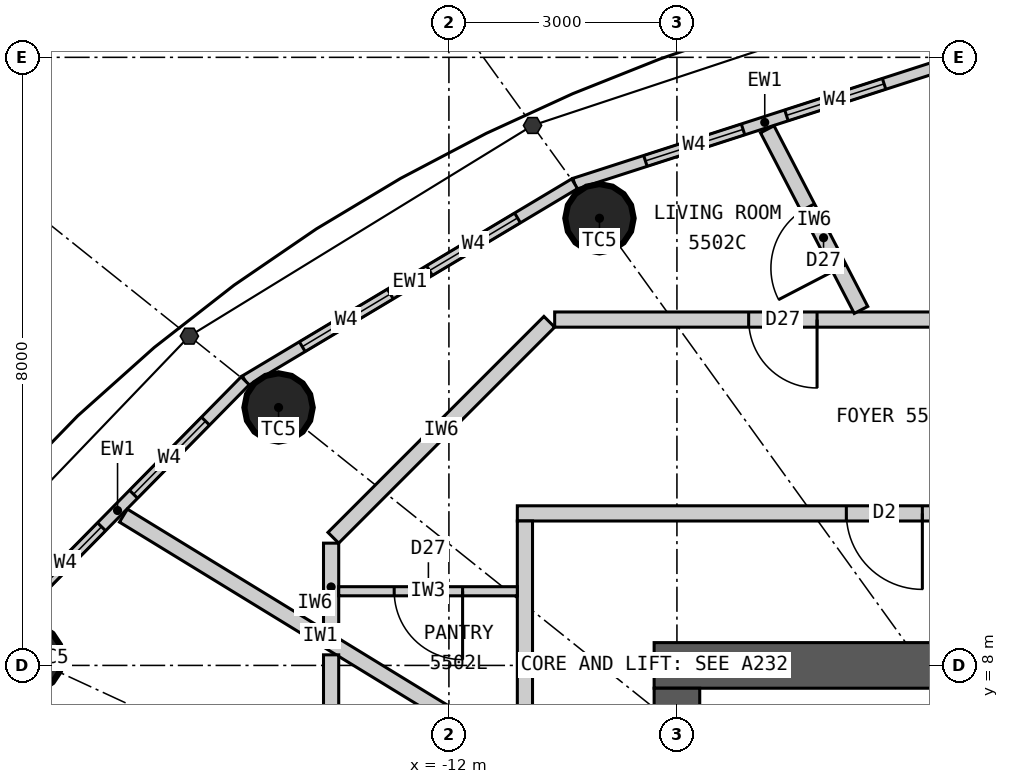
"""IFC4 building model, lengths in metres.
Left out: names, types, materials, properties, quantities, classifications, styles, units other than length and angle.
Written with IfcOpenShell. Run it as: python <this file> out.ifc"""

import sys

from ifc_helpers import new_model, si_unit, direction, frame, frame_2d, origin, origin_2d, place, context, subcontext, project, spatial, rectangle, circle, extrude, element, fill, save


model = new_model("IFC4")
c1 = context("Model", 3, precision=1e-05, world=origin(), true_north=direction((0.0, 1.0)))
c2 = subcontext(c1, "Body", "Model", "MODEL_VIEW")
j1 = project(units=[si_unit("LENGTHUNIT", "METRE"), si_unit("PLANEANGLEUNIT", "RADIAN")], contexts=[c1])
p1 = place(None, origin())
s1 = spatial("IfcSite", under=j1, at=p1, CompositionType="ELEMENT")
p2 = place(p1, origin())
s2 = spatial("IfcBuilding", under=s1, at=p2, CompositionType="ELEMENT")
p3 = place(p2, frame((0.0, 0.0, 206.1)))
s3 = spatial("IfcBuildingStorey", under=s2, at=p3, CompositionType="ELEMENT", Elevation=206.1)
for number, where, z_axis, x_axis in (
    (1, (-10.019, 13.883, 0.0), (0.0, 0.0, 1.0), (1.0, 0.0, 0.0)),
    (2, (-14.241, 11.393, 0.0), (0.0, 0.0, 1.0), (1.0, 0.0, 0.0)),
    (3, (-17.532, 8.098, 0.0), (0.0, 0.0, 1.0), (1.0, 0.0, 0.0)),
):
    element("IfcColumn", number, at=place(p3, frame(where, z_axis=z_axis, x_axis=x_axis)), inside=s3, PredefinedType="COLUMN", context=c2, shape_type="SweptSolid", body=[
        extrude(circle(Radius=0.45, at=origin_2d()), origin(), (0.0, 0.0, 1.0), 3.3),
    ])
p4 = place(p3, frame((-9.3, 8.0, 0.0), z_axis=(0.0, 0.0, 1.0), x_axis=(1.0, 0.0, 0.0)))
e4 = element("IfcWall", 4, at=p4, inside=s3, PredefinedType="SHEAR", context=c2, shape_type="SweptSolid", body=[
    extrude(rectangle(XDim=18.6, YDim=0.6, at=frame_2d((9.3, 0.0))), origin(), (0.0, 0.0, 1.0), 3.3),
])
p5 = place(p4, frame((8.0, 0.0, 0.0)))
e5 = element("IfcOpeningElement", 5, at=p5, cuts=e4, PredefinedType="OPENING", context=c2, shape_type="SweptSolid", body=[
    extrude(rectangle(XDim=1.2, YDim=2.2, at=frame_2d((0.6, 1.1))), frame((0.0, 0.31, 0.0), z_axis=(0.0, -1.0, 0.0), x_axis=(1.0, 0.0, 0.0)), (0.0, 0.0, 1.0), 0.62),
])
p6 = place(p4, frame((15.6, 0.0, 0.0)))
e6 = element("IfcOpeningElement", 6, at=p6, cuts=e4, PredefinedType="OPENING", context=c2, shape_type="SweptSolid", body=[
    extrude(rectangle(XDim=0.9, YDim=2.2, at=frame_2d((0.45, 1.1))), frame((0.0, 0.31, 0.0), z_axis=(0.0, -1.0, 0.0), x_axis=(1.0, 0.0, 0.0)), (0.0, 0.0, 1.0), 0.62),
])
p7 = place(p3, frame((-9.0, 7.7, 0.0), z_axis=(0.0, 0.0, 1.0), x_axis=(0.0, -1.0, 0.0)))
e7 = element("IfcWall", 7, at=p7, inside=s3, PredefinedType="SHEAR", context=c2, shape_type="SweptSolid", body=[
    extrude(rectangle(XDim=15.4, YDim=0.6, at=frame_2d((7.7, 0.0))), origin(), (0.0, 0.0, 1.0), 3.3),
])
p8 = place(p7, frame((6.8, 0.0, 0.0)))
e8 = element("IfcOpeningElement", 8, at=p8, cuts=e7, PredefinedType="OPENING", context=c2, shape_type="SweptSolid", body=[
    extrude(rectangle(XDim=1.8, YDim=2.2, at=frame_2d((0.9, 1.1))), frame((0.0, 0.31, 0.0), z_axis=(0.0, -1.0, 0.0), x_axis=(1.0, 0.0, 0.0)), (0.0, 0.0, 1.0), 0.62),
])
p9 = place(p3, frame((-5.343, 15.952, 0.0), z_axis=(0.0, 0.0, 1.0), x_axis=(-0.951644702515, -0.307200846638, 0.0)))
e9 = element("IfcWall", 9, at=p9, inside=s3, PredefinedType="ELEMENTEDWALL", context=c2, shape_type="SweptSolid", body=[
    extrude(rectangle(XDim=5.258, YDim=0.15, at=frame_2d((2.629, 0.0))), origin(), (0.0, 0.0, 1.0), 3.12),
])
p10 = place(p9, frame((0.979, 0.0, 0.9)))
e10 = element("IfcOpeningElement", 10, at=p10, cuts=e9, PredefinedType="OPENING", context=c2, shape_type="SweptSolid", body=[
    extrude(rectangle(XDim=1.35, YDim=1.9, at=frame_2d((0.675, 0.95))), frame((0.0, 0.085, 0.0), z_axis=(0.0, -1.0, 0.0), x_axis=(1.0, 0.0, 0.0)), (0.0, 0.0, 1.0), 0.17),
])
p11 = place(p9, frame((2.929, 0.0, 0.9)))
e11 = element("IfcOpeningElement", 11, at=p11, cuts=e9, PredefinedType="OPENING", context=c2, shape_type="SweptSolid", body=[
    extrude(rectangle(XDim=1.35, YDim=1.9, at=frame_2d((0.675, 0.95))), frame((0.0, 0.085, 0.0), z_axis=(0.0, -1.0, 0.0), x_axis=(1.0, 0.0, 0.0)), (0.0, 0.0, 1.0), 0.17),
])
p12 = place(p3, frame((-10.346, 14.336, 0.0), z_axis=(0.0, 0.0, 1.0), x_axis=(-0.85822150553, -0.513279502265, 0.0)))
e12 = element("IfcWall", 12, at=p12, inside=s3, PredefinedType="ELEMENTEDWALL", context=c2, shape_type="SweptSolid", body=[
    extrude(rectangle(XDim=5.05, YDim=0.15, at=frame_2d((2.525, 0.0))), origin(), (0.0, 0.0, 1.0), 3.12),
])
p13 = place(p12, frame((0.875, 0.0, 0.9)))
e13 = element("IfcOpeningElement", 13, at=p13, cuts=e12, PredefinedType="OPENING", context=c2, shape_type="SweptSolid", body=[
    extrude(rectangle(XDim=1.35, YDim=1.9, at=frame_2d((0.675, 0.95))), frame((0.0, 0.085, 0.0), z_axis=(0.0, -1.0, 0.0), x_axis=(1.0, 0.0, 0.0)), (0.0, 0.0, 1.0), 0.17),
])
p14 = place(p12, frame((2.825, 0.0, 0.9)))
e14 = element("IfcOpeningElement", 14, at=p14, cuts=e12, PredefinedType="OPENING", context=c2, shape_type="SweptSolid", body=[
    extrude(rectangle(XDim=1.35, YDim=1.9, at=frame_2d((0.675, 0.95))), frame((0.0, 0.085, 0.0), z_axis=(0.0, -1.0, 0.0), x_axis=(1.0, 0.0, 0.0)), (0.0, 0.0, 1.0), 0.17),
])
p15 = place(p3, frame((-14.68, 11.744, 0.0), z_axis=(0.0, 0.0, 1.0), x_axis=(-0.701527379618, -0.712642501993, 0.0)))
e15 = element("IfcWall", 15, at=p15, inside=s3, PredefinedType="ELEMENTEDWALL", context=c2, shape_type="SweptSolid", body=[
    extrude(rectangle(XDim=4.788, YDim=0.15, at=frame_2d((2.394, 0.0))), origin(), (0.0, 0.0, 1.0), 3.12),
])
p16 = place(p15, frame((0.744, 0.0, 0.9)))
e16 = element("IfcOpeningElement", 16, at=p16, cuts=e15, PredefinedType="OPENING", context=c2, shape_type="SweptSolid", body=[
    extrude(rectangle(XDim=1.35, YDim=1.9, at=frame_2d((0.675, 0.95))), frame((0.0, 0.085, 0.0), z_axis=(0.0, -1.0, 0.0), x_axis=(1.0, 0.0, 0.0)), (0.0, 0.0, 1.0), 0.17),
])
p17 = place(p15, frame((2.694, 0.0, 0.9)))
e17 = element("IfcOpeningElement", 17, at=p17, cuts=e15, PredefinedType="OPENING", context=c2, shape_type="SweptSolid", body=[
    extrude(rectangle(XDim=1.35, YDim=1.9, at=frame_2d((0.675, 0.95))), frame((0.0, 0.085, 0.0), z_axis=(0.0, -1.0, 0.0), x_axis=(1.0, 0.0, 0.0)), (0.0, 0.0, 1.0), 0.17),
])
p18 = place(p3, frame((-11.1, 10.0, 0.0), z_axis=(0.0, 0.0, 1.0), x_axis=(1.0, 0.0, 0.0)))
e18 = element("IfcWall", 18, at=p18, inside=s3, PredefinedType="PARTITIONING", context=c2, shape_type="SweptSolid", body=[
    extrude(rectangle(XDim=22.2, YDim=0.2, at=frame_2d((11.1, 0.0))), origin(), (0.0, 0.0, 1.0), 3.12),
])
p19 = place(p18, frame((20.9, 0.0, 0.0)))
e19 = element("IfcOpeningElement", 19, at=p19, cuts=e18, PredefinedType="OPENING", context=c2, shape_type="SweptSolid", body=[
    extrude(rectangle(XDim=1.0, YDim=2.2, at=frame_2d((0.5, 1.1))), frame((0.0, 0.11, 0.0), z_axis=(0.0, -1.0, 0.0), x_axis=(1.0, 0.0, 0.0)), (0.0, 0.0, 1.0), 0.22),
])
p20 = place(p18, frame((4.329, 0.0, 0.0)))
e20 = element("IfcOpeningElement", 20, at=p20, cuts=e18, PredefinedType="OPENING", context=c2, shape_type="SweptSolid", body=[
    extrude(rectangle(XDim=1.0, YDim=2.2, at=frame_2d((0.5, 1.1))), frame((0.0, 0.11, 0.0), z_axis=(0.0, -1.0, 0.0), x_axis=(1.0, 0.0, 0.0)), (0.0, 0.0, 1.0), 0.22),
])
p21 = place(p3, frame((-11.0, 9.9, 0.0), z_axis=(0.0, 0.0, 1.0), x_axis=(0.0, -1.0, 0.0)))
e21 = element("IfcWall", 21, at=p21, inside=s3, PredefinedType="PARTITIONING", context=c2, shape_type="SweptSolid", body=[
    extrude(rectangle(XDim=19.8, YDim=0.2, at=frame_2d((9.9, 0.0))), origin(), (0.0, 0.0, 1.0), 3.12),
])
p22 = place(p21, frame((5.075, 0.0, 0.0)))
e22 = element("IfcOpeningElement", 22, at=p22, cuts=e21, PredefinedType="OPENING", context=c2, shape_type="SweptSolid", body=[
    extrude(rectangle(XDim=1.0, YDim=2.2, at=frame_2d((0.5, 1.1))), frame((0.0, 0.11, 0.0), z_axis=(0.0, -1.0, 0.0), x_axis=(1.0, 0.0, 0.0)), (0.0, 0.0, 1.0), 0.22),
])
p23 = place(p21, frame((18.645, 0.0, 0.0)))
e23 = element("IfcOpeningElement", 23, at=p23, cuts=e21, PredefinedType="OPENING", context=c2, shape_type="SweptSolid", body=[
    extrude(rectangle(XDim=1.0, YDim=2.2, at=frame_2d((0.5, 1.1))), frame((0.0, 0.11, 0.0), z_axis=(0.0, -1.0, 0.0), x_axis=(1.0, 0.0, 0.0)), (0.0, 0.0, 1.0), 0.22),
])
p24 = place(p3, frame((-11.1, 6.797, 0.0), z_axis=(0.0, 0.0, 1.0), x_axis=(-0.852799818179, 0.522237943963, 0.0)))
e24 = element("IfcWall", 24, at=p24, inside=s3, PredefinedType="PARTITIONING", context=c2, shape_type="SweptSolid", body=[
    extrude(rectangle(XDim=6.077, YDim=0.2, at=frame_2d((3.039, 0.0))), origin(), (0.0, 0.0, 1.0), 3.12),
])
p25 = place(p3, frame((6.364, 12.55, 0.0), z_axis=(0.0, 0.0, 1.0), x_axis=(-1.0, 0.0, 0.0)))
e25 = element("IfcWall", 25, at=p25, inside=s3, PredefinedType="PARTITIONING", context=c2, shape_type="SweptSolid", body=[
    extrude(rectangle(XDim=16.972, YDim=0.2, at=frame_2d((8.486, 0.0))), origin(), (0.0, 0.0, 1.0), 3.12),
])
p26 = place(p25, frame((2.525, 0.0, 0.0)))
e26 = element("IfcOpeningElement", 26, at=p26, cuts=e25, PredefinedType="OPENING", context=c2, shape_type="SweptSolid", body=[
    extrude(rectangle(XDim=0.8, YDim=2.1, at=frame_2d((0.4, 1.05))), frame((0.0, 0.11, 0.0), z_axis=(0.0, -1.0, 0.0), x_axis=(1.0, 0.0, 0.0)), (0.0, 0.0, 1.0), 0.22),
])
p27 = place(p25, frame((4.145, 0.0, 0.0)))
e27 = element("IfcOpeningElement", 27, at=p27, cuts=e25, PredefinedType="OPENING", context=c2, shape_type="SweptSolid", body=[
    extrude(rectangle(XDim=0.9, YDim=2.1, at=frame_2d((0.45, 1.05))), frame((0.0, 0.11, 0.0), z_axis=(0.0, -1.0, 0.0), x_axis=(1.0, 0.0, 0.0)), (0.0, 0.0, 1.0), 0.22),
])
p28 = place(p25, frame((13.52, 0.0, 0.0)))
e28 = element("IfcOpeningElement", 28, at=p28, cuts=e25, PredefinedType="OPENING", context=c2, shape_type="SweptSolid", body=[
    extrude(rectangle(XDim=0.9, YDim=2.1, at=frame_2d((0.45, 1.05))), frame((0.0, 0.11, 0.0), z_axis=(0.0, -1.0, 0.0), x_axis=(1.0, 0.0, 0.0)), (0.0, 0.0, 1.0), 0.22),
])
p29 = place(p3, frame((-10.679, 12.521, 0.0), z_axis=(0.0, 0.0, 1.0), x_axis=(-0.707106781187, -0.707106781187, 0.0)))
e29 = element("IfcWall", 29, at=p29, inside=s3, PredefinedType="PARTITIONING", context=c2, shape_type="SweptSolid", body=[
    extrude(rectangle(XDim=4.019, YDim=0.2, at=frame_2d((2.009, 0.0))), origin(), (0.0, 0.0, 1.0), 3.12),
])
p30 = place(p3, frame((-13.55, 9.609, 0.0), z_axis=(0.0, 0.0, 1.0), x_axis=(0.0, -1.0, 0.0)))
e30 = element("IfcWall", 30, at=p30, inside=s3, PredefinedType="PARTITIONING", context=c2, shape_type="SweptSolid", body=[
    extrude(rectangle(XDim=1.153, YDim=0.2, at=frame_2d((0.576, 0.0))), origin(), (0.0, 0.0, 1.0), 3.12),
])
p31 = place(p3, frame((-6.578, 12.677, 0.0), z_axis=(0.0, 0.0, 1.0), x_axis=(-0.460620531465, 0.887597164255, 0.0)))
e31 = element("IfcWall", 31, at=p31, inside=s3, PredefinedType="PARTITIONING", context=c2, shape_type="SweptSolid", body=[
    extrude(rectangle(XDim=2.678, YDim=0.2, at=frame_2d((1.339, 0.0))), origin(), (0.0, 0.0, 1.0), 3.12),
])
p32 = place(p31, frame((0.62, 0.0, 0.0)))
e32 = element("IfcOpeningElement", 32, at=p32, cuts=e31, PredefinedType="OPENING", context=c2, shape_type="SweptSolid", body=[
    extrude(rectangle(XDim=0.9, YDim=2.1, at=frame_2d((0.45, 1.05))), frame((0.0, 0.11, 0.0), z_axis=(0.0, -1.0, 0.0), x_axis=(1.0, 0.0, 0.0)), (0.0, 0.0, 1.0), 0.22),
])
p33 = place(p3, frame((-11.1, 8.976, 0.0), z_axis=(0.0, 0.0, 1.0), x_axis=(-1.0, 0.0, 0.0)))
e33 = element("IfcWall", 33, at=p33, inside=s3, PredefinedType="PARTITIONING", context=c2, shape_type="SweptSolid", body=[
    extrude(rectangle(XDim=2.35, YDim=0.12, at=frame_2d((1.175, 0.0))), origin(), (0.0, 0.0, 1.0), 3.12),
])
p34 = place(p33, frame((0.72, 0.0, 0.0)))
e34 = element("IfcOpeningElement", 34, at=p34, cuts=e33, PredefinedType="OPENING", context=c2, shape_type="SweptSolid", body=[
    extrude(rectangle(XDim=0.9, YDim=2.1, at=frame_2d((0.45, 1.05))), frame((0.0, 0.07, 0.0), z_axis=(0.0, -1.0, 0.0), x_axis=(1.0, 0.0, 0.0)), (0.0, 0.0, 1.0), 0.14),
])
p35 = place(p3, frame((-13.55, 8.139, 0.0), z_axis=(0.0, 0.0, 1.0), x_axis=(0.0, -1.0, 0.0)))
e35 = element("IfcWall", 35, at=p35, inside=s3, PredefinedType="PARTITIONING", context=c2, shape_type="SweptSolid", body=[
    extrude(rectangle(XDim=12.496, YDim=0.2, at=frame_2d((6.248, 0.0))), origin(), (0.0, 0.0, 1.0), 3.12),
])
p36 = place(p35, frame((7.031, 0.0, 0.0)))
e36 = element("IfcOpeningElement", 36, at=p36, cuts=e35, PredefinedType="OPENING", context=c2, shape_type="SweptSolid", body=[
    extrude(rectangle(XDim=0.9, YDim=2.1, at=frame_2d((0.45, 1.05))), frame((0.0, 0.11, 0.0), z_axis=(0.0, -1.0, 0.0), x_axis=(1.0, 0.0, 0.0)), (0.0, 0.0, 1.0), 0.22),
])
p37 = place(p35, frame((9.373, 0.0, 0.0)))
e37 = element("IfcOpeningElement", 37, at=p37, cuts=e35, PredefinedType="OPENING", context=c2, shape_type="SweptSolid", body=[
    extrude(rectangle(XDim=0.8, YDim=2.1, at=frame_2d((0.4, 1.05))), frame((0.0, 0.11, 0.0), z_axis=(0.0, -1.0, 0.0), x_axis=(1.0, 0.0, 0.0)), (0.0, 0.0, 1.0), 0.22),
])
p38 = place(p35, frame((3.789, 0.0, 0.0)))
e38 = element("IfcOpeningElement", 38, at=p38, cuts=e35, PredefinedType="OPENING", context=c2, shape_type="SweptSolid", body=[
    extrude(rectangle(XDim=0.9, YDim=2.1, at=frame_2d((0.45, 1.05))), frame((0.0, 0.11, 0.0), z_axis=(0.0, -1.0, 0.0), x_axis=(1.0, 0.0, 0.0)), (0.0, 0.0, 1.0), 0.22),
])
p39 = place(p10, origin())
e39 = element("IfcWindow", 39, at=p39, inside=s3, PartitioningType="SINGLE_PANEL", PredefinedType="WINDOW", context=c2, shape_type="SweptSolid", body=[
    extrude(rectangle(XDim=1.35, YDim=1.9, at=frame_2d((0.675, 0.95))), frame((0.0, 0.03, 0.0), z_axis=(0.0, -1.0, 0.0), x_axis=(1.0, 0.0, 0.0)), (0.0, 0.0, 1.0), 0.06),
])
fill(e10, e39)
p40 = place(p11, origin())
e40 = element("IfcWindow", 40, at=p40, inside=s3, PartitioningType="SINGLE_PANEL", PredefinedType="WINDOW", context=c2, shape_type="SweptSolid", body=[
    extrude(rectangle(XDim=1.35, YDim=1.9, at=frame_2d((0.675, 0.95))), frame((0.0, 0.03, 0.0), z_axis=(0.0, -1.0, 0.0), x_axis=(1.0, 0.0, 0.0)), (0.0, 0.0, 1.0), 0.06),
])
fill(e11, e40)
p41 = place(p13, origin())
e41 = element("IfcWindow", 41, at=p41, inside=s3, PartitioningType="SINGLE_PANEL", PredefinedType="WINDOW", context=c2, shape_type="SweptSolid", body=[
    extrude(rectangle(XDim=1.35, YDim=1.9, at=frame_2d((0.675, 0.95))), frame((0.0, 0.03, 0.0), z_axis=(0.0, -1.0, 0.0), x_axis=(1.0, 0.0, 0.0)), (0.0, 0.0, 1.0), 0.06),
])
fill(e13, e41)
p42 = place(p14, origin())
e42 = element("IfcWindow", 42, at=p42, inside=s3, PartitioningType="SINGLE_PANEL", PredefinedType="WINDOW", context=c2, shape_type="SweptSolid", body=[
    extrude(rectangle(XDim=1.35, YDim=1.9, at=frame_2d((0.675, 0.95))), frame((0.0, 0.03, 0.0), z_axis=(0.0, -1.0, 0.0), x_axis=(1.0, 0.0, 0.0)), (0.0, 0.0, 1.0), 0.06),
])
fill(e14, e42)
p43 = place(p16, origin())
e43 = element("IfcWindow", 43, at=p43, inside=s3, PartitioningType="SINGLE_PANEL", PredefinedType="WINDOW", context=c2, shape_type="SweptSolid", body=[
    extrude(rectangle(XDim=1.35, YDim=1.9, at=frame_2d((0.675, 0.95))), frame((0.0, 0.03, 0.0), z_axis=(0.0, -1.0, 0.0), x_axis=(1.0, 0.0, 0.0)), (0.0, 0.0, 1.0), 0.06),
])
fill(e16, e43)
p44 = place(p17, origin())
e44 = element("IfcWindow", 44, at=p44, inside=s3, PartitioningType="SINGLE_PANEL", PredefinedType="WINDOW", context=c2, shape_type="SweptSolid", body=[
    extrude(rectangle(XDim=1.35, YDim=1.9, at=frame_2d((0.675, 0.95))), frame((0.0, 0.03, 0.0), z_axis=(0.0, -1.0, 0.0), x_axis=(1.0, 0.0, 0.0)), (0.0, 0.0, 1.0), 0.06),
])
fill(e17, e44)
p45 = place(p20, origin())
e45 = element("IfcDoor", 45, at=p45, inside=s3, OperationType="SINGLE_SWING_RIGHT", PredefinedType="DOOR", context=c2, shape_type="SweptSolid", body=[
    extrude(rectangle(XDim=1.0, YDim=2.2, at=frame_2d((0.5, 1.1))), frame((0.0, 0.025, 0.0), z_axis=(0.0, -1.0, 0.0), x_axis=(1.0, 0.0, 0.0)), (0.0, 0.0, 1.0), 0.05),
])
fill(e20, e45)
p46 = place(p34, origin())
e46 = element("IfcDoor", 46, at=p46, inside=s3, OperationType="SINGLE_SWING_LEFT", PredefinedType="DOOR", context=c2, shape_type="SweptSolid", body=[
    extrude(rectangle(XDim=0.9, YDim=2.1, at=frame_2d((0.45, 1.05))), frame((0.0, 0.025, 0.0), z_axis=(0.0, -1.0, 0.0), x_axis=(1.0, 0.0, 0.0)), (0.0, 0.0, 1.0), 0.05),
])
fill(e34, e46)
p47 = place(p28, origin())
e47 = element("IfcDoor", 47, at=p47, inside=s3, OperationType="SINGLE_SWING_LEFT", PredefinedType="DOOR", context=c2, shape_type="SweptSolid", body=[
    extrude(rectangle(XDim=0.9, YDim=2.1, at=frame_2d((0.45, 1.05))), frame((0.0, 0.025, 0.0), z_axis=(0.0, -1.0, 0.0), x_axis=(1.0, 0.0, 0.0)), (0.0, 0.0, 1.0), 0.05),
])
fill(e28, e47)
p48 = place(p32, origin())
e48 = element("IfcDoor", 48, at=p48, inside=s3, OperationType="SINGLE_SWING_LEFT", PredefinedType="DOOR", context=c2, shape_type="SweptSolid", body=[
    extrude(rectangle(XDim=0.9, YDim=2.1, at=frame_2d((0.45, 1.05))), frame((0.0, 0.025, 0.0), z_axis=(0.0, -1.0, 0.0), x_axis=(1.0, 0.0, 0.0)), (0.0, 0.0, 1.0), 0.05),
])
fill(e32, e48)
save(model, sys.argv[1])
